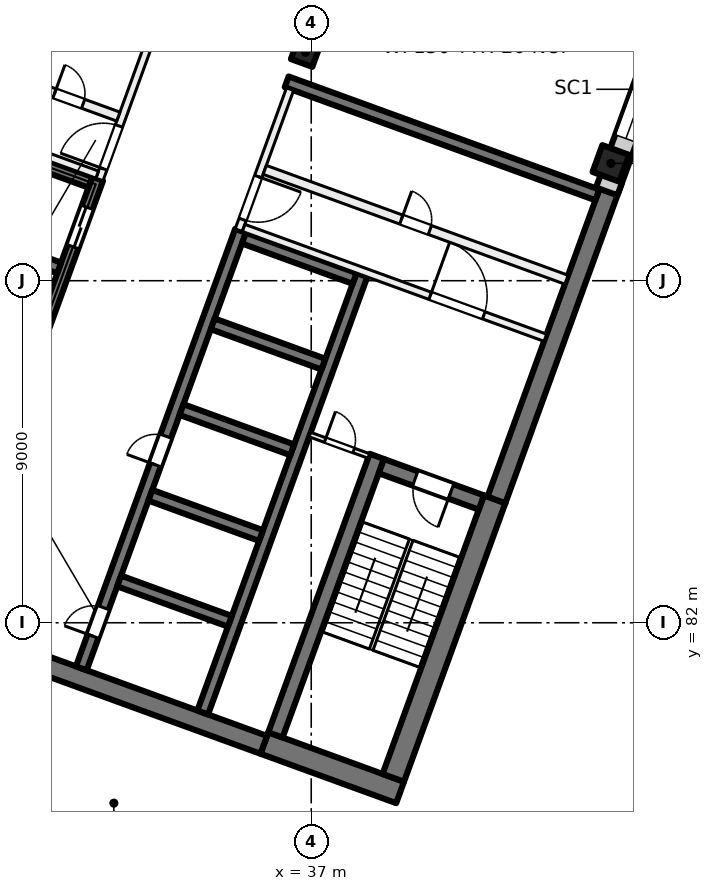
"""IFC4 building model, lengths in metres.
Left out: names, types, materials, properties, quantities, classifications, styles, units other than length and angle.
Written with IfcOpenShell. Run it as: python <this file> out.ifc"""

import sys

from ifc_helpers import new_model, si_unit, direction, frame, frame_2d, origin, origin_2d, place, context, subcontext, project, spatial, rectangle, extrude, element, fill, save


model = new_model("IFC4")
c1 = context("Model", 3, precision=1e-05, world=origin(), true_north=direction((0.0, 1.0)))
c2 = subcontext(c1, "Body", "Model", "MODEL_VIEW")
j1 = project(units=[si_unit("LENGTHUNIT", "METRE"), si_unit("PLANEANGLEUNIT", "RADIAN")], contexts=[c1])
p1 = place(None, origin())
s1 = spatial("IfcSite", under=j1, at=p1, CompositionType="ELEMENT")
p2 = place(p1, origin())
s2 = spatial("IfcBuilding", under=s1, at=p2, CompositionType="ELEMENT")
p3 = place(p2, frame((0.0, 0.0, 208.0)))
s3 = spatial("IfcBuildingStorey", under=s2, at=p3, CompositionType="ELEMENT", Elevation=208.0)
p4 = place(p3, frame((36.849, 97.011, 0.0), z_axis=(0.0, 0.0, 1.0), x_axis=(-0.342020143326, -0.939692620786, 0.0)))
e1 = element("IfcColumn", 1, at=p4, inside=s3, PredefinedType="COLUMN", context=c2, shape_type="SweptSolid", body=[
    extrude(rectangle(XDim=0.6, YDim=0.6, at=origin_2d()), origin(), (0.0, 0.0, 1.0), 4.0),
])
p5 = place(p3, frame((44.884, 94.087, 0.0), z_axis=(0.0, 0.0, 1.0), x_axis=(-0.342020143326, -0.939692620786, 0.0)))
e2 = element("IfcColumn", 2, at=p5, inside=s3, PredefinedType="COLUMN", context=c2, shape_type="SweptSolid", body=[
    extrude(rectangle(XDim=0.75, YDim=0.75, at=origin_2d()), origin(), (0.0, 0.0, 1.0), 4.0),
])
p6 = place(p3, frame((39.338, 77.535, 0.0), z_axis=(0.0, 0.0, 1.0), x_axis=(-0.939701471648, 0.341995824804, 0.0)))
e3 = element("IfcWall", 3, at=p6, inside=s3, PredefinedType="SHEAR", context=c2, shape_type="SweptSolid", body=[
    extrude(rectangle(XDim=3.8, YDim=0.6, at=frame_2d((1.9, 0.0))), origin(), (0.0, 0.0, 1.0), 4.0),
])
p7 = place(p3, frame((35.75, 78.788, 0.0), z_axis=(0.0, 0.0, 1.0), x_axis=(-0.939692894512, 0.342019391267, 0.0)))
e4 = element("IfcWall", 4, at=p7, inside=s3, PredefinedType="SHEAR", context=c2, shape_type="SweptSolid", body=[
    extrude(rectangle(XDim=14.4, YDim=0.5, at=frame_2d((7.2, 0.0))), origin(), (0.0, 0.0, 1.0), 4.0),
])
p8 = place(p3, frame((39.159, 77.92, 0.0), z_axis=(0.0, 0.0, 1.0), x_axis=(0.342016982193, 0.939693771338, 0.0)))
e5 = element("IfcWall", 5, at=p8, inside=s3, PredefinedType="SHEAR", context=c2, shape_type="SweptSolid", body=[
    extrude(rectangle(XDim=7.8, YDim=0.6, at=frame_2d((3.9, 0.0))), origin(), (0.0, 0.0, 1.0), 4.0),
])
p9 = place(p3, frame((41.874, 85.232, 0.0), z_axis=(0.0, 0.0, 1.0), x_axis=(0.342020437038, 0.939692513883, 0.0)))
e6 = element("IfcWall", 6, at=p9, inside=s3, PredefinedType="SHEAR", context=c2, shape_type="SweptSolid", body=[
    extrude(rectangle(XDim=8.975, YDim=0.5, at=frame_2d((4.487, 0.0))), origin(), (0.0, 0.0, 1.0), 4.0),
])
p10 = place(p3, frame((36.058, 79.048, 0.0), z_axis=(0.0, 0.0, 1.0), x_axis=(0.342016982193, 0.939693771338, 0.0)))
e7 = element("IfcWall", 7, at=p10, inside=s3, PredefinedType="SHEAR", context=c2, shape_type="SweptSolid", body=[
    extrude(rectangle(XDim=7.8, YDim=0.4, at=frame_2d((3.9, 0.0))), origin(), (0.0, 0.0, 1.0), 4.0),
])
p11 = place(p3, frame((41.476, 85.164, 0.0), z_axis=(0.0, 0.0, 1.0), x_axis=(-0.939678810556, 0.342058084236, 0.0)))
e8 = element("IfcWall", 8, at=p11, inside=s3, PredefinedType="SHEAR", context=c2, shape_type="SweptSolid", body=[
    extrude(rectangle(XDim=2.8, YDim=0.4, at=frame_2d((1.4, 0.0))), origin(), (0.0, 0.0, 1.0), 4.0),
])
p12 = place(p11, frame((0.85, 0.0, 0.0)))
e9 = element("IfcOpeningElement", 9, at=p12, cuts=e8, PredefinedType="OPENING", context=c2, shape_type="SweptSolid", body=[
    extrude(rectangle(XDim=1.0, YDim=2.1, at=frame_2d((0.5, 1.05))), frame((0.0, 0.21, 0.0), z_axis=(0.0, -1.0, 0.0), x_axis=(1.0, 0.0, 0.0)), (0.0, 0.0, 1.0), 0.42),
])
p13 = place(p3, frame((30.949, 80.801, 0.0), z_axis=(0.0, 0.0, 1.0), x_axis=(0.342016684409, 0.939693879721, 0.0)))
e10 = element("IfcWall", 10, at=p13, inside=s3, PredefinedType="SHEAR", context=c2, shape_type="SweptSolid", body=[
    extrude(rectangle(XDim=12.25, YDim=0.3, at=frame_2d((6.125, 0.0))), origin(), (0.0, 0.0, 1.0), 4.0),
])
p14 = place(p13, frame((0.9, 0.0, 0.0)))
e11 = element("IfcOpeningElement", 11, at=p14, cuts=e10, PredefinedType="OPENING", context=c2, shape_type="SweptSolid", body=[
    extrude(rectangle(XDim=0.8, YDim=2.1, at=frame_2d((0.4, 1.05))), frame((0.0, 0.16, 0.0), z_axis=(0.0, -1.0, 0.0), x_axis=(1.0, 0.0, 0.0)), (0.0, 0.0, 1.0), 0.32),
])
p15 = place(p13, frame((5.7, 0.0, 0.0)))
e12 = element("IfcOpeningElement", 12, at=p15, cuts=e10, PredefinedType="OPENING", context=c2, shape_type="SweptSolid", body=[
    extrude(rectangle(XDim=0.8, YDim=2.1, at=frame_2d((0.4, 1.05))), frame((0.0, 0.16, 0.0), z_axis=(0.0, -1.0, 0.0), x_axis=(1.0, 0.0, 0.0)), (0.0, 0.0, 1.0), 0.32),
])
p16 = place(p3, frame((34.144, 79.638, 0.0), z_axis=(0.0, 0.0, 1.0), x_axis=(0.342016684409, 0.939693879721, 0.0)))
e13 = element("IfcWall", 13, at=p16, inside=s3, PredefinedType="SHEAR", context=c2, shape_type="SweptSolid", body=[
    extrude(rectangle(XDim=12.25, YDim=0.3, at=frame_2d((6.125, 0.0))), origin(), (0.0, 0.0, 1.0), 4.0),
])
p17 = place(p3, frame((34.858, 82.039, 0.0), z_axis=(0.0, 0.0, 1.0), x_axis=(-0.939689908313, 0.342027595692, 0.0)))
e14 = element("IfcWall", 14, at=p17, inside=s3, PredefinedType="SHEAR", context=c2, shape_type="SweptSolid", body=[
    extrude(rectangle(XDim=3.1, YDim=0.3, at=frame_2d((1.55, 0.0))), origin(), (0.0, 0.0, 1.0), 4.0),
])
p18 = place(p3, frame((35.679, 84.294, 0.0), z_axis=(0.0, 0.0, 1.0), x_axis=(-0.939706007505, 0.341983361377, 0.0)))
e15 = element("IfcWall", 15, at=p18, inside=s3, PredefinedType="SHEAR", context=c2, shape_type="SweptSolid", body=[
    extrude(rectangle(XDim=3.1, YDim=0.3, at=frame_2d((1.55, 0.0))), origin(), (0.0, 0.0, 1.0), 4.0),
])
for number, where, z_axis, x_axis in (
    (16, (36.5, 86.549, 0.0), (0.0, 0.0, 1.0), (-0.94, 0.342, 0.0)),
    (17, (37.321, 88.805, 0.0), (0.0, 0.0, 1.0), (-0.94, 0.342, 0.0)),
    (18, (38.142, 91.06, 0.0), (0.0, 0.0, 1.0), (-0.94, 0.342, 0.0)),
):
    element("IfcWall", number, at=place(p3, frame(where, z_axis=z_axis, x_axis=x_axis)), inside=s3, PredefinedType="SHEAR", context=c2, shape_type="SweptSolid", body=[
        extrude(rectangle(XDim=3.1, YDim=0.3, at=frame_2d((1.55, 0.0))), origin(), (0.0, 0.0, 1.0), 4.0),
    ])
p19 = place(p3, frame((27.191, 82.169, 0.0), z_axis=(0.0, 0.0, 1.0), x_axis=(0.342016684409, 0.939693879721, 0.0)))
e19 = element("IfcWall", 19, at=p19, inside=s3, PredefinedType="SHEAR", context=c2, shape_type="SweptSolid", body=[
    extrude(rectangle(XDim=12.25, YDim=0.3, at=frame_2d((6.125, 0.0))), origin(), (0.0, 0.0, 1.0), 4.0),
])
p20 = place(p19, frame((0.75, 0.0, 0.0)))
e20 = element("IfcOpeningElement", 20, at=p20, cuts=e19, PredefinedType="OPENING", context=c2, shape_type="SweptSolid", body=[
    extrude(rectangle(XDim=1.1, YDim=2.1, at=frame_2d((0.55, 1.05))), frame((0.0, 0.16, 0.0), z_axis=(0.0, -1.0, 0.0), x_axis=(1.0, 0.0, 0.0)), (0.0, 0.0, 1.0), 0.32),
])
p21 = place(p19, frame((3.15, 0.0, 0.0)))
e21 = element("IfcOpeningElement", 21, at=p21, cuts=e19, PredefinedType="OPENING", context=c2, shape_type="SweptSolid", body=[
    extrude(rectangle(XDim=1.1, YDim=2.1, at=frame_2d((0.55, 1.05))), frame((0.0, 0.16, 0.0), z_axis=(0.0, -1.0, 0.0), x_axis=(1.0, 0.0, 0.0)), (0.0, 0.0, 1.0), 0.32),
])
p22 = place(p19, frame((5.55, 0.0, 0.0)))
e22 = element("IfcOpeningElement", 22, at=p22, cuts=e19, PredefinedType="OPENING", context=c2, shape_type="SweptSolid", body=[
    extrude(rectangle(XDim=1.1, YDim=2.1, at=frame_2d((0.55, 1.05))), frame((0.0, 0.16, 0.0), z_axis=(0.0, -1.0, 0.0), x_axis=(1.0, 0.0, 0.0)), (0.0, 0.0, 1.0), 0.32),
])
p23 = place(p19, frame((10.35, 0.0, 0.0)))
e23 = element("IfcOpeningElement", 23, at=p23, cuts=e19, PredefinedType="OPENING", context=c2, shape_type="SweptSolid", body=[
    extrude(rectangle(XDim=1.1, YDim=2.1, at=frame_2d((0.55, 1.05))), frame((0.0, 0.16, 0.0), z_axis=(0.0, -1.0, 0.0), x_axis=(1.0, 0.0, 0.0)), (0.0, 0.0, 1.0), 0.32),
])
for number, where, z_axis, x_axis in (
    (24, (30.367, 91.336, 0.0), (0.0, 0.0, 1.0), (-0.94, 0.342, 0.0)),
    (25, (31.188, 93.591, 0.0), (0.0, 0.0, 1.0), (-0.94, 0.342, 0.0)),
):
    element("IfcWall", number, at=place(p3, frame(where, z_axis=z_axis, x_axis=x_axis)), inside=s3, PredefinedType="SHEAR", context=c2, shape_type="SweptSolid", body=[
        extrude(rectangle(XDim=3.1, YDim=0.3, at=frame_2d((1.55, 0.0))), origin(), (0.0, 0.0, 1.0), 4.0),
    ])
p24 = place(p3, frame((44.529, 93.258, 0.0), z_axis=(0.0, 0.0, 1.0), x_axis=(-0.9396917844, 0.342022441267, 0.0)))
e26 = element("IfcWall", 26, at=p24, inside=s3, PredefinedType="SHEAR", context=c2, shape_type="SweptSolid", body=[
    extrude(rectangle(XDim=8.7, YDim=0.3, at=frame_2d((4.35, 0.0))), origin(), (0.0, 0.0, 1.0), 4.0),
])
p25 = place(p3, frame((52.212, 113.783, 0.0), z_axis=(0.0, 0.0, 1.0), x_axis=(-0.34202521188, -0.939690775968, 0.0)))
e27 = element("IfcWall", 27, at=p25, inside=s3, PredefinedType="SOLIDWALL", context=c2, shape_type="SweptSolid", body=[
    extrude(rectangle(XDim=21.745, YDim=0.6, at=frame_2d((10.873, 0.0))), origin(), (0.0, 0.0, 1.0), 3.625),
])
p26 = place(p25, frame((3.765, 0.0, 0.9)))
e28 = element("IfcOpeningElement", 28, at=p26, cuts=e27, PredefinedType="OPENING", context=c2, shape_type="SweptSolid", body=[
    extrude(rectangle(XDim=3.0, YDim=2.4, at=frame_2d((1.5, 1.2))), frame((0.0, 0.31, 0.0), z_axis=(0.0, -1.0, 0.0), x_axis=(1.0, 0.0, 0.0)), (0.0, 0.0, 1.0), 0.62),
])
p27 = place(p25, frame((8.265, 0.0, 0.9)))
e29 = element("IfcOpeningElement", 29, at=p27, cuts=e27, PredefinedType="OPENING", context=c2, shape_type="SweptSolid", body=[
    extrude(rectangle(XDim=3.0, YDim=2.4, at=frame_2d((1.5, 1.2))), frame((0.0, 0.31, 0.0), z_axis=(0.0, -1.0, 0.0), x_axis=(1.0, 0.0, 0.0)), (0.0, 0.0, 1.0), 0.62),
])
p28 = place(p25, frame((12.765, 0.0, 0.9)))
e30 = element("IfcOpeningElement", 30, at=p28, cuts=e27, PredefinedType="OPENING", context=c2, shape_type="SweptSolid", body=[
    extrude(rectangle(XDim=3.0, YDim=2.4, at=frame_2d((1.5, 1.2))), frame((0.0, 0.31, 0.0), z_axis=(0.0, -1.0, 0.0), x_axis=(1.0, 0.0, 0.0)), (0.0, 0.0, 1.0), 0.62),
])
p29 = place(p25, frame((17.265, 0.0, 0.9)))
e31 = element("IfcOpeningElement", 31, at=p29, cuts=e27, PredefinedType="OPENING", context=c2, shape_type="SweptSolid", body=[
    extrude(rectangle(XDim=3.0, YDim=2.4, at=frame_2d((1.5, 1.2))), frame((0.0, 0.31, 0.0), z_axis=(0.0, -1.0, 0.0), x_axis=(1.0, 0.0, 0.0)), (0.0, 0.0, 1.0), 0.62),
])
p30 = place(p3, frame((31.427, 93.663, 0.0), z_axis=(0.0, 0.0, 1.0), x_axis=(0.342030870568, 0.93968871632, 0.0)))
e32 = element("IfcWall", 32, at=p30, inside=s3, PredefinedType="PARTITIONING", context=c2, shape_type="SweptSolid", body=[
    extrude(rectangle(XDim=3.95, YDim=0.2, at=frame_2d((1.975, 0.0))), origin(), (0.0, 0.0, 1.0), 3.625),
])
p31 = place(p30, frame((0.3, 0.0, 0.0)))
e33 = element("IfcOpeningElement", 33, at=p31, cuts=e32, PredefinedType="OPENING", context=c2, shape_type="SweptSolid", body=[
    extrude(rectangle(XDim=1.2, YDim=2.1, at=frame_2d((0.6, 1.05))), frame((0.0, 0.11, 0.0), z_axis=(0.0, -1.0, 0.0), x_axis=(1.0, 0.0, 0.0)), (0.0, 0.0, 1.0), 0.22),
])
p32 = place(p3, frame((23.427, 96.682, 0.0), z_axis=(0.0, 0.0, 1.0), x_axis=(0.939690465531, -0.342026064782, 0.0)))
e34 = element("IfcWall", 34, at=p32, inside=s3, PredefinedType="PARTITIONING", context=c2, shape_type="SweptSolid", body=[
    extrude(rectangle(XDim=8.45, YDim=0.2, at=frame_2d((4.225, 0.0))), origin(), (0.0, 0.0, 1.0), 3.625),
])
p33 = place(p32, frame((1.725, 0.0, 0.0)))
e35 = element("IfcOpeningElement", 35, at=p33, cuts=e34, PredefinedType="OPENING", context=c2, shape_type="SweptSolid", body=[
    extrude(rectangle(XDim=1.5, YDim=2.1, at=frame_2d((0.75, 1.05))), frame((0.0, 0.11, 0.0), z_axis=(0.0, -1.0, 0.0), x_axis=(1.0, 0.0, 0.0)), (0.0, 0.0, 1.0), 0.22),
])
p34 = place(p3, frame((23.983, 98.208, 0.0), z_axis=(0.0, 0.0, 1.0), x_axis=(0.939699751196, -0.342000552051, 0.0)))
e36 = element("IfcWall", 36, at=p34, inside=s3, PredefinedType="PARTITIONING", context=c2, shape_type="SweptSolid", body=[
    extrude(rectangle(XDim=8.45, YDim=0.25, at=frame_2d((4.225, 0.0))), origin(), (0.0, 0.0, 1.0), 3.625),
])
p35 = place(p34, frame((6.665, 0.0, 0.0)))
e37 = element("IfcOpeningElement", 37, at=p35, cuts=e36, PredefinedType="OPENING", context=c2, shape_type="SweptSolid", body=[
    extrude(rectangle(XDim=0.8, YDim=2.1, at=frame_2d((0.4, 1.05))), frame((0.0, 0.135, 0.0), z_axis=(0.0, -1.0, 0.0), x_axis=(1.0, 0.0, 0.0)), (0.0, 0.0, 1.0), 0.27),
])
p36 = place(p34, frame((2.29, 0.0, 0.0)))
e38 = element("IfcOpeningElement", 38, at=p36, cuts=e36, PredefinedType="OPENING", context=c2, shape_type="SweptSolid", body=[
    extrude(rectangle(XDim=1.0, YDim=2.1, at=frame_2d((0.5, 1.05))), frame((0.0, 0.135, 0.0), z_axis=(0.0, -1.0, 0.0), x_axis=(1.0, 0.0, 0.0)), (0.0, 0.0, 1.0), 0.27),
])
p37 = place(p3, frame((36.443, 96.041, 0.0), z_axis=(0.0, 0.0, 1.0), x_axis=(-0.341996156931, -0.939701350773, 0.0)))
e39 = element("IfcWall", 39, at=p37, inside=s3, PredefinedType="PARTITIONING", context=c2, shape_type="SweptSolid", body=[
    extrude(rectangle(XDim=3.95, YDim=0.2, at=frame_2d((1.975, 0.0))), origin(), (0.0, 0.0, 1.0), 3.625),
])
p38 = place(p37, frame((2.45, 0.0, 0.0)))
e40 = element("IfcOpeningElement", 40, at=p38, cuts=e39, PredefinedType="OPENING", context=c2, shape_type="SweptSolid", body=[
    extrude(rectangle(XDim=1.2, YDim=2.1, at=frame_2d((0.6, 1.05))), frame((0.0, 0.11, 0.0), z_axis=(0.0, -1.0, 0.0), x_axis=(1.0, 0.0, 0.0)), (0.0, 0.0, 1.0), 0.22),
])
p39 = place(p3, frame((35.22, 92.389, 0.0), z_axis=(0.0, 0.0, 1.0), x_axis=(0.939690465531, -0.342026064782, 0.0)))
e41 = element("IfcWall", 41, at=p39, inside=s3, PredefinedType="PARTITIONING", context=c2, shape_type="SweptSolid", body=[
    extrude(rectangle(XDim=8.45, YDim=0.2, at=frame_2d((4.225, 0.0))), origin(), (0.0, 0.0, 1.0), 3.625),
])
p40 = place(p39, frame((5.225, 0.0, 0.0)))
e42 = element("IfcOpeningElement", 42, at=p40, cuts=e41, PredefinedType="OPENING", context=c2, shape_type="SweptSolid", body=[
    extrude(rectangle(XDim=1.5, YDim=2.1, at=frame_2d((0.75, 1.05))), frame((0.0, 0.11, 0.0), z_axis=(0.0, -1.0, 0.0), x_axis=(1.0, 0.0, 0.0)), (0.0, 0.0, 1.0), 0.22),
])
p41 = place(p3, frame((35.776, 93.916, 0.0), z_axis=(0.0, 0.0, 1.0), x_axis=(0.939690465531, -0.342026064782, 0.0)))
e43 = element("IfcWall", 43, at=p41, inside=s3, PredefinedType="PARTITIONING", context=c2, shape_type="SweptSolid", body=[
    extrude(rectangle(XDim=8.45, YDim=0.25, at=frame_2d((4.225, 0.0))), origin(), (0.0, 0.0, 1.0), 3.625),
])
p42 = place(p41, frame((3.825, 0.0, 0.0)))
e44 = element("IfcOpeningElement", 44, at=p42, cuts=e43, PredefinedType="OPENING", context=c2, shape_type="SweptSolid", body=[
    extrude(rectangle(XDim=0.8, YDim=2.1, at=frame_2d((0.4, 1.05))), frame((0.0, 0.135, 0.0), z_axis=(0.0, -1.0, 0.0), x_axis=(1.0, 0.0, 0.0)), (0.0, 0.0, 1.0), 0.27),
])
p43 = place(p3, frame((36.966, 86.952, 0.0), z_axis=(0.0, 0.0, 1.0), x_axis=(0.939672407396, -0.342075674051, 0.0)))
e45 = element("IfcWall", 45, at=p43, inside=s3, PredefinedType="PARTITIONING", context=c2, shape_type="SweptSolid", body=[
    extrude(rectangle(XDim=1.65, YDim=0.125, at=frame_2d((0.825, 0.0))), origin(), (0.0, 0.0, 1.0), 3.625),
])
p44 = place(p43, frame((0.425, 0.0, 0.0)))
e46 = element("IfcOpeningElement", 46, at=p44, cuts=e45, PredefinedType="OPENING", context=c2, shape_type="SweptSolid", body=[
    extrude(rectangle(XDim=0.8, YDim=2.1, at=frame_2d((0.4, 1.05))), frame((0.0, 0.073, 0.0), z_axis=(0.0, -1.0, 0.0), x_axis=(1.0, 0.0, 0.0)), (0.0, 0.0, 1.0), 0.145),
])
p45 = place(p29, origin())
e47 = element("IfcWindow", 47, at=p45, inside=s3, PartitioningType="SINGLE_PANEL", PredefinedType="WINDOW", context=c2, shape_type="SweptSolid", body=[
    extrude(rectangle(XDim=3.0, YDim=2.4, at=frame_2d((1.5, 1.2))), frame((0.0, 0.03, 0.0), z_axis=(0.0, -1.0, 0.0), x_axis=(1.0, 0.0, 0.0)), (0.0, 0.0, 1.0), 0.06),
])
fill(e31, e47)
p46 = place(p23, origin())
e48 = element("IfcDoor", 48, at=p46, inside=s3, OperationType="DOUBLE_DOOR_SLIDING", PredefinedType="DOOR", context=c2, shape_type="SweptSolid", body=[
    extrude(rectangle(XDim=1.1, YDim=2.1, at=frame_2d((0.55, 1.05))), frame((0.0, 0.025, 0.0), z_axis=(0.0, -1.0, 0.0), x_axis=(1.0, 0.0, 0.0)), (0.0, 0.0, 1.0), 0.05),
])
fill(e23, e48)
p47 = place(p14, origin())
e49 = element("IfcDoor", 49, at=p47, inside=s3, OperationType="SINGLE_SWING_LEFT", PredefinedType="DOOR", context=c2, shape_type="SweptSolid", body=[
    extrude(rectangle(XDim=0.8, YDim=2.1, at=frame_2d((0.4, 1.05))), frame((0.0, 0.025, 0.0), z_axis=(0.0, -1.0, 0.0), x_axis=(1.0, 0.0, 0.0)), (0.0, 0.0, 1.0), 0.05),
])
fill(e11, e49)
p48 = place(p15, origin())
e50 = element("IfcDoor", 50, at=p48, inside=s3, OperationType="SINGLE_SWING_RIGHT", PredefinedType="DOOR", context=c2, shape_type="SweptSolid", body=[
    extrude(rectangle(XDim=0.8, YDim=2.1, at=frame_2d((0.4, 1.05))), frame((0.0, 0.025, 0.0), z_axis=(0.0, -1.0, 0.0), x_axis=(1.0, 0.0, 0.0)), (0.0, 0.0, 1.0), 0.05),
])
fill(e12, e50)
p49 = place(p31, origin())
e51 = element("IfcDoor", 51, at=p49, inside=s3, OperationType="DOUBLE_DOOR_SINGLE_SWING", PredefinedType="DOOR", context=c2, shape_type="SweptSolid", body=[
    extrude(rectangle(XDim=1.2, YDim=2.1, at=frame_2d((0.6, 1.05))), frame((0.0, 0.025, 0.0), z_axis=(0.0, -1.0, 0.0), x_axis=(1.0, 0.0, 0.0)), (0.0, 0.0, 1.0), 0.05),
])
fill(e33, e51)
p50 = place(p35, origin())
e52 = element("IfcDoor", 52, at=p50, inside=s3, OperationType="SINGLE_SWING_LEFT", PredefinedType="DOOR", context=c2, shape_type="SweptSolid", body=[
    extrude(rectangle(XDim=0.8, YDim=2.1, at=frame_2d((0.4, 1.05))), frame((0.0, 0.025, 0.0), z_axis=(0.0, -1.0, 0.0), x_axis=(1.0, 0.0, 0.0)), (0.0, 0.0, 1.0), 0.05),
])
fill(e37, e52)
p51 = place(p38, origin())
e53 = element("IfcDoor", 53, at=p51, inside=s3, OperationType="DOUBLE_DOOR_SINGLE_SWING", PredefinedType="DOOR", context=c2, shape_type="SweptSolid", body=[
    extrude(rectangle(XDim=1.2, YDim=2.1, at=frame_2d((0.6, 1.05))), frame((0.0, 0.025, 0.0), z_axis=(0.0, -1.0, 0.0), x_axis=(1.0, 0.0, 0.0)), (0.0, 0.0, 1.0), 0.05),
])
fill(e40, e53)
p52 = place(p40, origin())
e54 = element("IfcDoor", 54, at=p52, inside=s3, OperationType="DOUBLE_DOOR_SINGLE_SWING", PredefinedType="DOOR", context=c2, shape_type="SweptSolid", body=[
    extrude(rectangle(XDim=1.5, YDim=2.1, at=frame_2d((0.75, 1.05))), frame((0.0, 0.025, 0.0), z_axis=(0.0, -1.0, 0.0), x_axis=(1.0, 0.0, 0.0)), (0.0, 0.0, 1.0), 0.05),
])
fill(e42, e54)
p53 = place(p12, origin())
e55 = element("IfcDoor", 55, at=p53, inside=s3, OperationType="SINGLE_SWING_RIGHT", PredefinedType="DOOR", context=c2, shape_type="SweptSolid", body=[
    extrude(rectangle(XDim=1.0, YDim=2.1, at=frame_2d((0.5, 1.05))), frame((0.0, 0.025, 0.0), z_axis=(0.0, -1.0, 0.0), x_axis=(1.0, 0.0, 0.0)), (0.0, 0.0, 1.0), 0.05),
])
fill(e9, e55)
p54 = place(p44, origin())
e56 = element("IfcDoor", 56, at=p54, inside=s3, OperationType="SINGLE_SWING_LEFT", PredefinedType="DOOR", context=c2, shape_type="SweptSolid", body=[
    extrude(rectangle(XDim=0.8, YDim=2.1, at=frame_2d((0.4, 1.05))), frame((0.0, 0.025, 0.0), z_axis=(0.0, -1.0, 0.0), x_axis=(1.0, 0.0, 0.0)), (0.0, 0.0, 1.0), 0.05),
])
fill(e46, e56)
p55 = place(p42, origin())
e57 = element("IfcDoor", 57, at=p55, inside=s3, OperationType="SINGLE_SWING_RIGHT", PredefinedType="DOOR", context=c2, shape_type="SweptSolid", body=[
    extrude(rectangle(XDim=0.8, YDim=2.1, at=frame_2d((0.4, 1.05))), frame((0.0, 0.025, 0.0), z_axis=(0.0, -1.0, 0.0), x_axis=(1.0, 0.0, 0.0)), (0.0, 0.0, 1.0), 0.05),
])
fill(e44, e57)
save(model, sys.argv[1])
